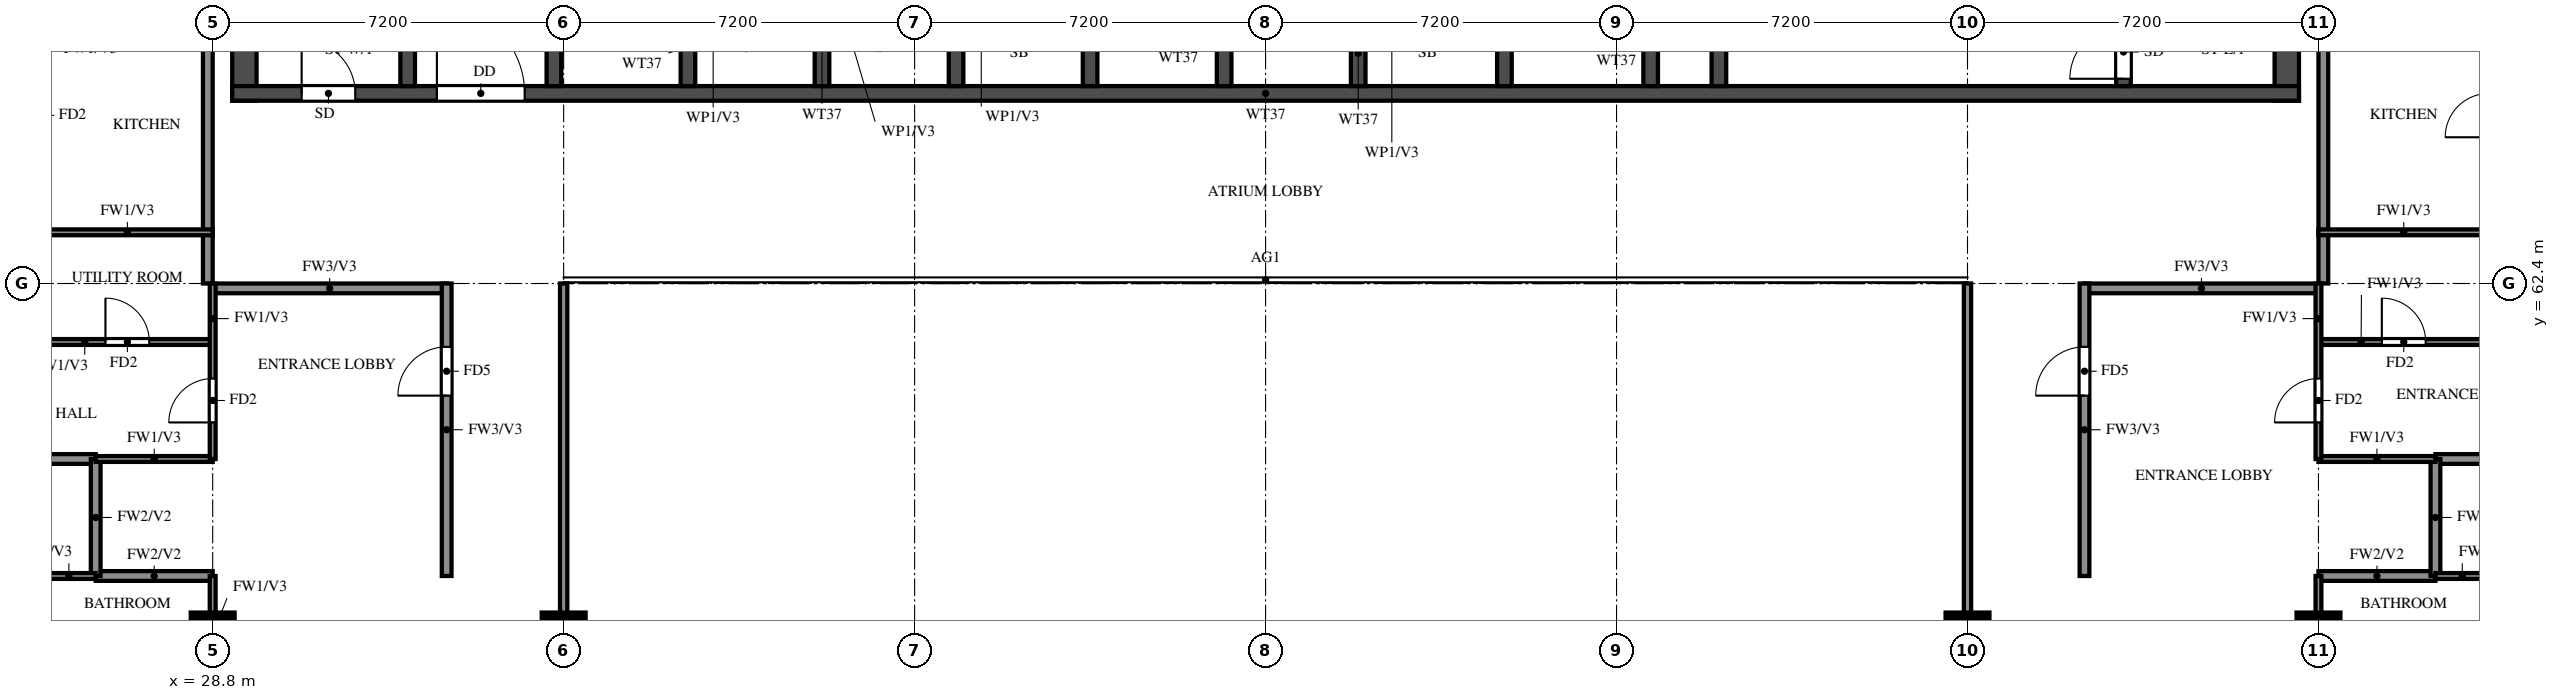
"""IFC4 building model, lengths in metres.
Left out: names, types, materials, properties, quantities, classifications, styles, units other than length and angle.
Written with IfcOpenShell. Run it as: python <this file> out.ifc"""

import sys

from ifc_helpers import new_model, si_unit, direction, frame, frame_2d, origin, origin_2d, place, context, subcontext, project, spatial, rectangle, extrude, source, transform, mapped, element, fill, save


model = new_model("IFC4")
c1 = context("Model", 3, precision=1e-05, world=origin(), true_north=direction((0.0, 1.0)))
c2 = subcontext(c1, "Body", "Model", "MODEL_VIEW")
j1 = project(units=[si_unit("LENGTHUNIT", "METRE"), si_unit("PLANEANGLEUNIT", "RADIAN")], contexts=[c1])
p1 = place(None, origin())
s1 = spatial("IfcSite", under=j1, at=p1, CompositionType="ELEMENT")
p2 = place(p1, origin())
s2 = spatial("IfcBuilding", under=s1, at=p2, CompositionType="ELEMENT")
p3 = place(p2, frame((0.0, 0.0, 218.5)))
s3 = spatial("IfcBuildingStorey", under=s2, at=p3, CompositionType="ELEMENT", Elevation=218.5)
m1 = source(origin(), c2, "Body", "SweptSolid", [
    extrude(rectangle(XDim=0.9, YDim=0.9, at=origin_2d()), origin(), (0.0, 0.0, 1.0), 3.22),
])
for number, where, z_axis, x_axis in (
    (1, (28.8, 55.2, 0.0), (0.0, 0.0, 1.0), (1.0, 0.0, 0.0)),
    (2, (36.0, 55.2, 0.0), (0.0, 0.0, 1.0), (1.0, 0.0, 0.0)),
    (3, (64.8, 55.2, 0.0), (0.0, 0.0, 1.0), (1.0, 0.0, 0.0)),
    (4, (72.0, 55.2, 0.0), (0.0, 0.0, 1.0), (1.0, 0.0, 0.0)),
):
    element("IfcColumn", number, at=place(p3, frame(where, z_axis=z_axis, x_axis=x_axis)), inside=s3, PredefinedType="COLUMN", context=c2, shape_type="MappedRepresentation", body=[
        mapped(m1, transform((0.0, 0.0, 0.0))),
    ])
for number, where, z_axis, x_axis in (
    (5, (29.45, 66.15, 0.0), (0.0, 0.0, 1.0), (0.0, 1.0, 0.0)),
    (6, (71.35, 66.15, 0.0), (0.0, 0.0, 1.0), (0.0, 1.0, 0.0)),
):
    element("IfcWall", number, at=place(p3, frame(where, z_axis=z_axis, x_axis=x_axis)), inside=s3, PredefinedType="SHEAR", context=c2, shape_type="SweptSolid", body=[
        extrude(rectangle(XDim=11.85, YDim=0.5, at=frame_2d((5.925, 0.0))), origin(), (0.0, 0.0, 1.0), 3.22),
    ])
p4 = place(p3, frame((29.2, 66.3, 0.0), z_axis=(0.0, 0.0, 1.0), x_axis=(1.0, 0.0, 0.0)))
e7 = element("IfcWall", 7, at=p4, inside=s3, PredefinedType="SHEAR", context=c2, shape_type="SweptSolid", body=[
    extrude(rectangle(XDim=42.4, YDim=0.3, at=frame_2d((21.2, 0.0))), origin(), (0.0, 0.0, 1.0), 3.22),
])
p5 = place(p4, frame((1.425, 0.0, 0.0)))
e8 = element("IfcOpeningElement", 8, at=p5, cuts=e7, PredefinedType="OPENING", context=c2, shape_type="SweptSolid", body=[
    extrude(rectangle(XDim=1.1, YDim=2.1, at=frame_2d((0.55, 1.05))), frame((0.0, 0.16, 0.0), z_axis=(0.0, -1.0, 0.0), x_axis=(1.0, 0.0, 0.0)), (0.0, 0.0, 1.0), 0.32),
])
p6 = place(p4, frame((4.2, 0.0, 0.0)))
e9 = element("IfcOpeningElement", 9, at=p6, cuts=e7, PredefinedType="OPENING", context=c2, shape_type="SweptSolid", body=[
    extrude(rectangle(XDim=1.8, YDim=2.1, at=frame_2d((0.9, 1.05))), frame((0.0, 0.16, 0.0), z_axis=(0.0, -1.0, 0.0), x_axis=(1.0, 0.0, 0.0)), (0.0, 0.0, 1.0), 0.32),
])
p7 = place(p3, frame((32.8, 66.45, 0.0), z_axis=(0.0, 0.0, 1.0), x_axis=(0.0, 1.0, 0.0)))
e10 = element("IfcWall", 10, at=p7, inside=s3, PredefinedType="SHEAR", context=c2, shape_type="SweptSolid", body=[
    extrude(rectangle(XDim=11.05, YDim=0.3, at=frame_2d((5.525, 0.0))), origin(), (0.0, 0.0, 1.0), 3.22),
])
p8 = place(p3, frame((68.0, 66.45, 0.0), z_axis=(0.0, 0.0, 1.0), x_axis=(0.0, 1.0, 0.0)))
e11 = element("IfcWall", 11, at=p8, inside=s3, PredefinedType="SHEAR", context=c2, shape_type="SweptSolid", body=[
    extrude(rectangle(XDim=11.05, YDim=0.3, at=frame_2d((5.525, 0.0))), origin(), (0.0, 0.0, 1.0), 3.22),
])
p9 = place(p8, frame((0.15, 0.0, 0.0)))
e12 = element("IfcOpeningElement", 12, at=p9, cuts=e11, PredefinedType="OPENING", context=c2, shape_type="SweptSolid", body=[
    extrude(rectangle(XDim=1.1, YDim=2.1, at=frame_2d((0.55, 1.05))), frame((0.0, 0.16, 0.0), z_axis=(0.0, -1.0, 0.0), x_axis=(1.0, 0.0, 0.0)), (0.0, 0.0, 1.0), 0.32),
])
p10 = place(p3, frame((59.7, 66.45, 0.0), z_axis=(0.0, 0.0, 1.0), x_axis=(0.0, 1.0, 0.0)))
e13 = element("IfcWall", 13, at=p10, inside=s3, PredefinedType="SHEAR", context=c2, shape_type="SweptSolid", body=[
    extrude(rectangle(XDim=6.175, YDim=0.3, at=frame_2d((3.087, 0.0))), origin(), (0.0, 0.0, 1.0), 3.22),
])
p11 = place(p10, frame((3.85, 0.0, 0.0)))
e14 = element("IfcOpeningElement", 14, at=p11, cuts=e13, PredefinedType="OPENING", context=c2, shape_type="SweptSolid", body=[
    extrude(rectangle(XDim=1.2, YDim=2.1, at=frame_2d((0.6, 1.05))), frame((0.0, 0.16, 0.0), z_axis=(0.0, -1.0, 0.0), x_axis=(1.0, 0.0, 0.0)), (0.0, 0.0, 1.0), 0.32),
])
for number, where, z_axis, x_axis in (
    (15, (35.8, 66.45, 0.0), (0.0, 0.0, 1.0), (0.0, 1.0, 0.0)),
    (16, (38.55, 66.45, 0.0), (0.0, 0.0, 1.0), (0.0, 1.0, 0.0)),
    (17, (41.3, 66.45, 0.0), (0.0, 0.0, 1.0), (0.0, 1.0, 0.0)),
    (18, (44.05, 66.45, 0.0), (0.0, 0.0, 1.0), (0.0, 1.0, 0.0)),
    (19, (46.8, 66.45, 0.0), (0.0, 0.0, 1.0), (0.0, 1.0, 0.0)),
    (20, (49.55, 66.45, 0.0), (0.0, 0.0, 1.0), (0.0, 1.0, 0.0)),
    (21, (52.3, 66.45, 0.0), (0.0, 0.0, 1.0), (0.0, 1.0, 0.0)),
    (22, (55.3, 66.45, 0.0), (0.0, 0.0, 1.0), (0.0, 1.0, 0.0)),
    (23, (58.3, 66.45, 0.0), (0.0, 0.0, 1.0), (0.0, 1.0, 0.0)),
):
    element("IfcWall", number, at=place(p3, frame(where, z_axis=z_axis, x_axis=x_axis)), inside=s3, PredefinedType="SHEAR", context=c2, shape_type="SweptSolid", body=[
        extrude(rectangle(XDim=2.425, YDim=0.3, at=frame_2d((1.212, 0.0))), origin(), (0.0, 0.0, 1.0), 3.22),
    ])
for number, where, z_axis, x_axis in (
    (24, (28.8, 62.3, 0.0), (0.0, 0.0, 1.0), (1.0, 0.0, 0.0)),
    (25, (67.2, 62.3, 0.0), (0.0, 0.0, 1.0), (1.0, 0.0, 0.0)),
):
    element("IfcWall", number, at=place(p3, frame(where, z_axis=z_axis, x_axis=x_axis)), inside=s3, PredefinedType="SOLIDWALL", context=c2, shape_type="SweptSolid", body=[
        extrude(rectangle(XDim=4.8, YDim=0.2, at=frame_2d((2.4, 0.0))), origin(), (0.0, 0.0, 1.0), 3.22),
    ])
p12 = place(p3, frame((28.7, 62.4, 0.0), z_axis=(0.0, 0.0, 1.0), x_axis=(0.0, 1.0, 0.0)))
e26 = element("IfcWall", 26, at=p12, inside=s3, PredefinedType="SOLIDWALL", context=c2, shape_type="SweptSolid", body=[
    extrude(rectangle(XDim=15.6, YDim=0.2, at=frame_2d((7.8, 0.0))), origin(), (0.0, 0.0, 1.0), 3.22),
])
p13 = place(p3, frame((33.6, 56.4, 0.0), z_axis=(0.0, 0.0, 1.0), x_axis=(0.0, 1.0, 0.0)))
e27 = element("IfcWall", 27, at=p13, inside=s3, PredefinedType="SOLIDWALL", context=c2, shape_type="SweptSolid", body=[
    extrude(rectangle(XDim=6.0, YDim=0.2, at=frame_2d((3.0, 0.0))), origin(), (0.0, 0.0, 1.0), 3.22),
])
p14 = place(p13, frame((3.7, 0.0, 0.0)))
e28 = element("IfcOpeningElement", 28, at=p14, cuts=e27, PredefinedType="OPENING", context=c2, shape_type="SweptSolid", body=[
    extrude(rectangle(XDim=1.0, YDim=2.1, at=frame_2d((0.5, 1.05))), frame((0.0, 0.11, 0.0), z_axis=(0.0, -1.0, 0.0), x_axis=(1.0, 0.0, 0.0)), (0.0, 0.0, 1.0), 0.22),
])
p15 = place(p3, frame((67.2, 56.4, 0.0), z_axis=(0.0, 0.0, 1.0), x_axis=(0.0, 1.0, 0.0)))
e29 = element("IfcWall", 29, at=p15, inside=s3, PredefinedType="SOLIDWALL", context=c2, shape_type="SweptSolid", body=[
    extrude(rectangle(XDim=6.0, YDim=0.2, at=frame_2d((3.0, 0.0))), origin(), (0.0, 0.0, 1.0), 3.22),
])
p16 = place(p15, frame((3.7, 0.0, 0.0)))
e30 = element("IfcOpeningElement", 30, at=p16, cuts=e29, PredefinedType="OPENING", context=c2, shape_type="SweptSolid", body=[
    extrude(rectangle(XDim=1.0, YDim=2.1, at=frame_2d((0.5, 1.05))), frame((0.0, 0.11, 0.0), z_axis=(0.0, -1.0, 0.0), x_axis=(1.0, 0.0, 0.0)), (0.0, 0.0, 1.0), 0.22),
])
p17 = place(p3, frame((72.1, 62.4, 0.0), z_axis=(0.0, 0.0, 1.0), x_axis=(0.0, 1.0, 0.0)))
e31 = element("IfcWall", 31, at=p17, inside=s3, PredefinedType="SOLIDWALL", context=c2, shape_type="SweptSolid", body=[
    extrude(rectangle(XDim=15.6, YDim=0.2, at=frame_2d((7.8, 0.0))), origin(), (0.0, 0.0, 1.0), 3.22),
])
p18 = place(p3, frame((26.4, 56.4, 0.0), z_axis=(0.0, 0.0, 1.0), x_axis=(1.0, 0.0, 0.0)))
e32 = element("IfcWall", 32, at=p18, inside=s3, PredefinedType="SOLIDWALL", context=c2, shape_type="SweptSolid", body=[
    extrude(rectangle(XDim=2.4, YDim=0.2, at=frame_2d((1.2, 0.0))), origin(), (0.0, 0.0, 1.0), 3.22),
])
p19 = place(p3, frame((72.0, 56.4, 0.0), z_axis=(0.0, 0.0, 1.0), x_axis=(1.0, 0.0, 0.0)))
e33 = element("IfcWall", 33, at=p19, inside=s3, PredefinedType="SOLIDWALL", context=c2, shape_type="SweptSolid", body=[
    extrude(rectangle(XDim=2.4, YDim=0.2, at=frame_2d((1.2, 0.0))), origin(), (0.0, 0.0, 1.0), 3.22),
])
for number, where, z_axis, x_axis in (
    (34, (18.525, 58.8, 0.0), (0.0, 0.0, 1.0), (1.0, 0.0, 0.0)),
    (35, (74.4, 58.8, 0.0), (0.0, 0.0, 1.0), (1.0, 0.0, 0.0)),
):
    element("IfcWall", number, at=place(p3, frame(where, z_axis=z_axis, x_axis=x_axis)), inside=s3, PredefinedType="SOLIDWALL", context=c2, shape_type="SweptSolid", body=[
        extrude(rectangle(XDim=7.875, YDim=0.2, at=frame_2d((3.938, 0.0))), origin(), (0.0, 0.0, 1.0), 2.32),
    ])
for number, where, z_axis, x_axis in (
    (36, (26.4, 56.4, 0.0), (0.0, 0.0, 1.0), (0.0, 1.0, 0.0)),
    (37, (74.4, 56.4, 0.0), (0.0, 0.0, 1.0), (0.0, 1.0, 0.0)),
):
    element("IfcWall", number, at=place(p3, frame(where, z_axis=z_axis, x_axis=x_axis)), inside=s3, PredefinedType="SOLIDWALL", context=c2, shape_type="SweptSolid", body=[
        extrude(rectangle(XDim=2.4, YDim=0.2, at=frame_2d((1.2, 0.0))), origin(), (0.0, 0.0, 1.0), 3.22),
    ])
p20 = place(p3, frame((25.3, 56.4, 0.0), z_axis=(0.0, 0.0, 1.0), x_axis=(1.0, 0.0, 0.0)))
e38 = element("IfcWall", 38, at=p20, inside=s3, PredefinedType="PARTITIONING", context=c2, shape_type="SweptSolid", body=[
    extrude(rectangle(XDim=1.1, YDim=0.12, at=frame_2d((0.55, 0.0))), origin(), (0.0, 0.0, 1.0), 3.22),
])
p21 = place(p3, frame((74.4, 56.4, 0.0), z_axis=(0.0, 0.0, 1.0), x_axis=(1.0, 0.0, 0.0)))
e39 = element("IfcWall", 39, at=p21, inside=s3, PredefinedType="PARTITIONING", context=c2, shape_type="SweptSolid", body=[
    extrude(rectangle(XDim=1.1, YDim=0.12, at=frame_2d((0.55, 0.0))), origin(), (0.0, 0.0, 1.0), 3.22),
])
p22 = place(p3, frame((26.4, 58.8, 0.0), z_axis=(0.0, 0.0, 1.0), x_axis=(1.0, 0.0, 0.0)))
e40 = element("IfcWall", 40, at=p22, inside=s3, PredefinedType="PARTITIONING", context=c2, shape_type="SweptSolid", body=[
    extrude(rectangle(XDim=2.4, YDim=0.12, at=frame_2d((1.2, 0.0))), origin(), (0.0, 0.0, 1.0), 3.22),
])
p23 = place(p3, frame((72.0, 58.8, 0.0), z_axis=(0.0, 0.0, 1.0), x_axis=(1.0, 0.0, 0.0)))
e41 = element("IfcWall", 41, at=p23, inside=s3, PredefinedType="PARTITIONING", context=c2, shape_type="SweptSolid", body=[
    extrude(rectangle(XDim=2.4, YDim=0.12, at=frame_2d((1.2, 0.0))), origin(), (0.0, 0.0, 1.0), 3.22),
])
p24 = place(p3, frame((25.3, 61.2, 0.0), z_axis=(0.0, 0.0, 1.0), x_axis=(1.0, 0.0, 0.0)))
e42 = element("IfcWall", 42, at=p24, inside=s3, PredefinedType="PARTITIONING", context=c2, shape_type="SweptSolid", body=[
    extrude(rectangle(XDim=3.5, YDim=0.12, at=frame_2d((1.75, 0.0))), origin(), (0.0, 0.0, 1.0), 3.22),
])
p25 = place(p24, frame((1.3, 0.0, 0.0)))
e43 = element("IfcOpeningElement", 43, at=p25, cuts=e42, PredefinedType="OPENING", context=c2, shape_type="SweptSolid", body=[
    extrude(rectangle(XDim=0.9, YDim=2.1, at=frame_2d((0.45, 1.05))), frame((0.0, 0.07, 0.0), z_axis=(0.0, -1.0, 0.0), x_axis=(1.0, 0.0, 0.0)), (0.0, 0.0, 1.0), 0.14),
])
p26 = place(p3, frame((72.0, 61.2, 0.0), z_axis=(0.0, 0.0, 1.0), x_axis=(1.0, 0.0, 0.0)))
e44 = element("IfcWall", 44, at=p26, inside=s3, PredefinedType="PARTITIONING", context=c2, shape_type="SweptSolid", body=[
    extrude(rectangle(XDim=3.5, YDim=0.12, at=frame_2d((1.75, 0.0))), origin(), (0.0, 0.0, 1.0), 3.22),
])
p27 = place(p26, frame((1.3, 0.0, 0.0)))
e45 = element("IfcOpeningElement", 45, at=p27, cuts=e44, PredefinedType="OPENING", context=c2, shape_type="SweptSolid", body=[
    extrude(rectangle(XDim=0.9, YDim=2.1, at=frame_2d((0.45, 1.05))), frame((0.0, 0.07, 0.0), z_axis=(0.0, -1.0, 0.0), x_axis=(1.0, 0.0, 0.0)), (0.0, 0.0, 1.0), 0.14),
])
for number, where, z_axis, x_axis in (
    (46, (25.3, 63.45, 0.0), (0.0, 0.0, 1.0), (1.0, 0.0, 0.0)),
    (47, (72.0, 63.45, 0.0), (0.0, 0.0, 1.0), (1.0, 0.0, 0.0)),
):
    element("IfcWall", number, at=place(p3, frame(where, z_axis=z_axis, x_axis=x_axis)), inside=s3, PredefinedType="PARTITIONING", context=c2, shape_type="SweptSolid", body=[
        extrude(rectangle(XDim=3.5, YDim=0.12, at=frame_2d((1.75, 0.0))), origin(), (0.0, 0.0, 1.0), 3.22),
    ])
p28 = place(p3, frame((28.8, 54.0, 0.0), z_axis=(0.0, 0.0, 1.0), x_axis=(0.0, 1.0, 0.0)))
e48 = element("IfcWall", 48, at=p28, inside=s3, PredefinedType="PARTITIONING", context=c2, shape_type="SweptSolid", body=[
    extrude(rectangle(XDim=2.4, YDim=0.12, at=frame_2d((1.2, 0.0))), origin(), (0.0, 0.0, 1.0), 3.22),
])
p29 = place(p3, frame((28.8, 58.8, 0.0), z_axis=(0.0, 0.0, 1.0), x_axis=(0.0, 1.0, 0.0)))
e49 = element("IfcWall", 49, at=p29, inside=s3, PredefinedType="PARTITIONING", context=c2, shape_type="SweptSolid", body=[
    extrude(rectangle(XDim=3.6, YDim=0.12, at=frame_2d((1.8, 0.0))), origin(), (0.0, 0.0, 1.0), 3.22),
])
p30 = place(p29, frame((0.75, 0.0, 0.0)))
e50 = element("IfcOpeningElement", 50, at=p30, cuts=e49, PredefinedType="OPENING", context=c2, shape_type="SweptSolid", body=[
    extrude(rectangle(XDim=0.9, YDim=2.1, at=frame_2d((0.45, 1.05))), frame((0.0, 0.07, 0.0), z_axis=(0.0, -1.0, 0.0), x_axis=(1.0, 0.0, 0.0)), (0.0, 0.0, 1.0), 0.14),
])
p31 = place(p3, frame((72.0, 54.0, 0.0), z_axis=(0.0, 0.0, 1.0), x_axis=(0.0, 1.0, 0.0)))
e51 = element("IfcWall", 51, at=p31, inside=s3, PredefinedType="PARTITIONING", context=c2, shape_type="SweptSolid", body=[
    extrude(rectangle(XDim=2.4, YDim=0.12, at=frame_2d((1.2, 0.0))), origin(), (0.0, 0.0, 1.0), 3.22),
])
p32 = place(p3, frame((72.0, 58.8, 0.0), z_axis=(0.0, 0.0, 1.0), x_axis=(0.0, 1.0, 0.0)))
e52 = element("IfcWall", 52, at=p32, inside=s3, PredefinedType="PARTITIONING", context=c2, shape_type="SweptSolid", body=[
    extrude(rectangle(XDim=3.6, YDim=0.12, at=frame_2d((1.8, 0.0))), origin(), (0.0, 0.0, 1.0), 3.22),
])
p33 = place(p32, frame((0.75, 0.0, 0.0)))
e53 = element("IfcOpeningElement", 53, at=p33, cuts=e52, PredefinedType="OPENING", context=c2, shape_type="SweptSolid", body=[
    extrude(rectangle(XDim=0.9, YDim=2.1, at=frame_2d((0.45, 1.05))), frame((0.0, 0.07, 0.0), z_axis=(0.0, -1.0, 0.0), x_axis=(1.0, 0.0, 0.0)), (0.0, 0.0, 1.0), 0.14),
])
for number, where, z_axis, x_axis in (
    (54, (36.0, 48.0, 0.0), (0.0, 0.0, 1.0), (0.0, 1.0, 0.0)),
    (55, (64.8, 48.0, 0.0), (0.0, 0.0, 1.0), (0.0, 1.0, 0.0)),
):
    element("IfcWall", number, at=place(p3, frame(where, z_axis=z_axis, x_axis=x_axis)), inside=s3, PredefinedType="SOLIDWALL", context=c2, shape_type="SweptSolid", body=[
        extrude(rectangle(XDim=14.4, YDim=0.15, at=frame_2d((7.2, 0.0))), origin(), (0.0, 0.0, 1.0), 2.32),
    ])
p34 = place(p5, origin())
e56 = element("IfcDoor", 56, at=p34, inside=s3, OperationType="SINGLE_SWING_LEFT", PredefinedType="DOOR", context=c2, shape_type="SweptSolid", body=[
    extrude(rectangle(XDim=1.1, YDim=2.1, at=frame_2d((0.55, 1.05))), frame((0.0, 0.025, 0.0), z_axis=(0.0, -1.0, 0.0), x_axis=(1.0, 0.0, 0.0)), (0.0, 0.0, 1.0), 0.05),
])
fill(e8, e56)
p35 = place(p9, origin())
e57 = element("IfcDoor", 57, at=p35, inside=s3, OperationType="SINGLE_SWING_RIGHT", PredefinedType="DOOR", context=c2, shape_type="SweptSolid", body=[
    extrude(rectangle(XDim=1.1, YDim=2.1, at=frame_2d((0.55, 1.05))), frame((0.0, 0.025, 0.0), z_axis=(0.0, -1.0, 0.0), x_axis=(1.0, 0.0, 0.0)), (0.0, 0.0, 1.0), 0.05),
])
fill(e12, e57)
p36 = place(p6, origin())
e58 = element("IfcDoor", 58, at=p36, inside=s3, OperationType="DOUBLE_DOOR_SINGLE_SWING", PredefinedType="DOOR", context=c2, shape_type="SweptSolid", body=[
    extrude(rectangle(XDim=1.8, YDim=2.1, at=frame_2d((0.9, 1.05))), frame((0.0, 0.025, 0.0), z_axis=(0.0, -1.0, 0.0), x_axis=(1.0, 0.0, 0.0)), (0.0, 0.0, 1.0), 0.05),
])
fill(e9, e58)
p37 = place(p30, origin())
e59 = element("IfcDoor", 59, at=p37, inside=s3, OperationType="SINGLE_SWING_LEFT", PredefinedType="DOOR", context=c2, shape_type="SweptSolid", body=[
    extrude(rectangle(XDim=0.9, YDim=2.1, at=frame_2d((0.45, 1.05))), frame((0.0, 0.025, 0.0), z_axis=(0.0, -1.0, 0.0), x_axis=(1.0, 0.0, 0.0)), (0.0, 0.0, 1.0), 0.05),
])
fill(e50, e59)
p38 = place(p14, origin())
e60 = element("IfcDoor", 60, at=p38, inside=s3, OperationType="SINGLE_SWING_RIGHT", PredefinedType="DOOR", context=c2, shape_type="SweptSolid", body=[
    extrude(rectangle(XDim=1.0, YDim=2.1, at=frame_2d((0.5, 1.05))), frame((0.0, 0.025, 0.0), z_axis=(0.0, -1.0, 0.0), x_axis=(1.0, 0.0, 0.0)), (0.0, 0.0, 1.0), 0.05),
])
fill(e28, e60)
p39 = place(p25, origin())
e61 = element("IfcDoor", 61, at=p39, inside=s3, OperationType="SINGLE_SWING_LEFT", PredefinedType="DOOR", context=c2, shape_type="SweptSolid", body=[
    extrude(rectangle(XDim=0.9, YDim=2.1, at=frame_2d((0.45, 1.05))), frame((0.0, 0.025, 0.0), z_axis=(0.0, -1.0, 0.0), x_axis=(1.0, 0.0, 0.0)), (0.0, 0.0, 1.0), 0.05),
])
fill(e43, e61)
p40 = place(p33, origin())
e62 = element("IfcDoor", 62, at=p40, inside=s3, OperationType="SINGLE_SWING_RIGHT", PredefinedType="DOOR", context=c2, shape_type="SweptSolid", body=[
    extrude(rectangle(XDim=0.9, YDim=2.1, at=frame_2d((0.45, 1.05))), frame((0.0, 0.025, 0.0), z_axis=(0.0, -1.0, 0.0), x_axis=(1.0, 0.0, 0.0)), (0.0, 0.0, 1.0), 0.05),
])
fill(e53, e62)
p41 = place(p16, origin())
e63 = element("IfcDoor", 63, at=p41, inside=s3, OperationType="SINGLE_SWING_LEFT", PredefinedType="DOOR", context=c2, shape_type="SweptSolid", body=[
    extrude(rectangle(XDim=1.0, YDim=2.1, at=frame_2d((0.5, 1.05))), frame((0.0, 0.025, 0.0), z_axis=(0.0, -1.0, 0.0), x_axis=(1.0, 0.0, 0.0)), (0.0, 0.0, 1.0), 0.05),
])
fill(e30, e63)
p42 = place(p27, origin())
e64 = element("IfcDoor", 64, at=p42, inside=s3, OperationType="SINGLE_SWING_RIGHT", PredefinedType="DOOR", context=c2, shape_type="SweptSolid", body=[
    extrude(rectangle(XDim=0.9, YDim=2.1, at=frame_2d((0.45, 1.05))), frame((0.0, 0.025, 0.0), z_axis=(0.0, -1.0, 0.0), x_axis=(1.0, 0.0, 0.0)), (0.0, 0.0, 1.0), 0.05),
])
fill(e45, e64)
save(model, sys.argv[1])
